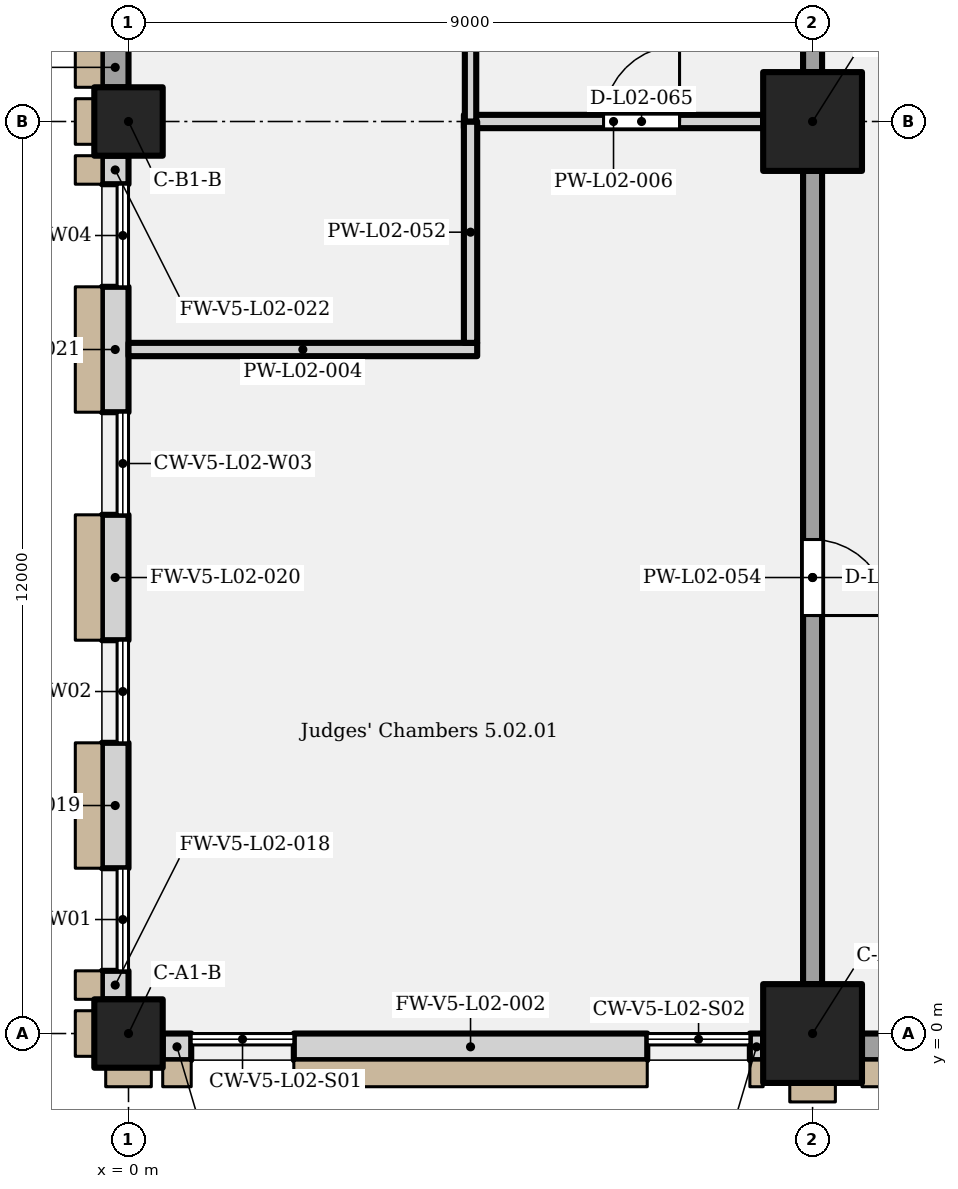
"""IFC4 building model, lengths in metres.
Left out: names, types, materials, properties, quantities, classifications, styles, units other than length and angle.
Written with IfcOpenShell. Run it as: python <this file> out.ifc"""

import sys

from ifc_helpers import new_model, si_unit, direction, frame, frame_2d, origin, origin_with_axes, origin_2d, place, context, subcontext, project, spatial, rectangle, extrude, element, fill, save


model = new_model("IFC4")
c1 = context("Model", 3, precision=1e-05, world=origin(), true_north=direction((0.0, 1.0)))
c2 = subcontext(c1, "Body", "Model", "MODEL_VIEW")
j1 = project(units=[si_unit("LENGTHUNIT", "METRE"), si_unit("PLANEANGLEUNIT", "RADIAN")], contexts=[c1])
p1 = place(None, origin())
s1 = spatial("IfcSite", under=j1, at=p1, CompositionType="ELEMENT")
p2 = place(p1, origin())
s2 = spatial("IfcBuilding", under=s1, at=p2, CompositionType="ELEMENT")
p3 = place(p2, frame((0.0, 0.0, 12.0)))
s3 = spatial("IfcBuildingStorey", under=s2, at=p3, CompositionType="ELEMENT", Elevation=12.0)
p4 = place(p3, origin_with_axes())
e1 = element("IfcColumn", 1, at=p4, inside=s3, PredefinedType="COLUMN", context=c2, shape_type="SweptSolid", body=[
    extrude(rectangle(XDim=0.9, YDim=0.9, at=origin_2d()), origin(), (0.0, 0.0, 1.0), 5.4),
])
p5 = place(p3, frame((9.0, 0.0, 0.0), z_axis=(0.0, 0.0, 1.0), x_axis=(1.0, 0.0, 0.0)))
e2 = element("IfcColumn", 2, at=p5, inside=s3, PredefinedType="COLUMN", context=c2, shape_type="SweptSolid", body=[
    extrude(rectangle(XDim=1.3, YDim=1.3, at=origin_2d()), origin(), (0.0, 0.0, 1.0), 5.4),
])
p6 = place(p3, frame((0.0, 12.0, 0.0), z_axis=(0.0, 0.0, 1.0), x_axis=(1.0, 0.0, 0.0)))
e3 = element("IfcColumn", 3, at=p6, inside=s3, PredefinedType="COLUMN", context=c2, shape_type="SweptSolid", body=[
    extrude(rectangle(XDim=0.9, YDim=0.9, at=origin_2d()), origin(), (0.0, 0.0, 1.0), 5.4),
])
p7 = place(p3, frame((9.0, 12.0, 0.0), z_axis=(0.0, 0.0, 1.0), x_axis=(1.0, 0.0, 0.0)))
e4 = element("IfcColumn", 4, at=p7, inside=s3, PredefinedType="COLUMN", context=c2, shape_type="SweptSolid", body=[
    extrude(rectangle(XDim=1.3, YDim=1.3, at=origin_2d()), origin(), (0.0, 0.0, 1.0), 5.4),
])
p8 = place(p3, frame((0.45, -0.175, 0.0), z_axis=(0.0, 0.0, 1.0), x_axis=(1.0, 0.0, 0.0)))
e5 = element("IfcWall", 5, at=p8, inside=s3, PredefinedType="SOLIDWALL", context=c2, shape_type="SweptSolid", body=[
    extrude(rectangle(XDim=0.375, YDim=0.35, at=frame_2d((0.188, 0.0))), origin(), (0.0, 0.0, 1.0), 5.15),
])
p9 = place(p3, frame((2.175, -0.175, 0.0), z_axis=(0.0, 0.0, 1.0), x_axis=(1.0, 0.0, 0.0)))
e6 = element("IfcWall", 6, at=p9, inside=s3, PredefinedType="SOLIDWALL", context=c2, shape_type="SweptSolid", body=[
    extrude(rectangle(XDim=4.65, YDim=0.35, at=frame_2d((2.325, 0.0))), origin(), (0.0, 0.0, 1.0), 5.15),
])
p10 = place(p3, frame((8.175, -0.175, 0.0), z_axis=(0.0, 0.0, 1.0), x_axis=(1.0, 0.0, 0.0)))
e7 = element("IfcWall", 7, at=p10, inside=s3, PredefinedType="SOLIDWALL", context=c2, shape_type="SweptSolid", body=[
    extrude(rectangle(XDim=0.175, YDim=0.35, at=frame_2d((0.087, 0.0))), origin(), (0.0, 0.0, 1.0), 5.15),
])
p11 = place(p3, frame((9.65, -0.175, 0.0), z_axis=(0.0, 0.0, 1.0), x_axis=(1.0, 0.0, 0.0)))
e8 = element("IfcWall", 8, at=p11, inside=s3, PredefinedType="SOLIDWALL", context=c2, shape_type="SweptSolid", body=[
    extrude(rectangle(XDim=7.7, YDim=0.35, at=frame_2d((3.85, 0.0))), origin(), (0.0, 0.0, 1.0), 5.15),
])
p12 = place(p3, frame((-0.175, 0.45, 0.0), z_axis=(0.0, 0.0, 1.0), x_axis=(0.0, 1.0, 0.0)))
e9 = element("IfcWall", 9, at=p12, inside=s3, PredefinedType="SOLIDWALL", context=c2, shape_type="SweptSolid", body=[
    extrude(rectangle(XDim=0.375, YDim=0.35, at=frame_2d((0.188, 0.0))), origin(), (0.0, 0.0, 1.0), 5.15),
])
for number, where, z_axis, x_axis in (
    (10, (-0.175, 2.175, 0.0), (0.0, 0.0, 1.0), (0.0, 1.0, 0.0)),
    (11, (-0.175, 5.175, 0.0), (0.0, 0.0, 1.0), (0.0, 1.0, 0.0)),
    (12, (-0.175, 8.175, 0.0), (0.0, 0.0, 1.0), (0.0, 1.0, 0.0)),
):
    element("IfcWall", number, at=place(p3, frame(where, z_axis=z_axis, x_axis=x_axis)), inside=s3, PredefinedType="SOLIDWALL", context=c2, shape_type="SweptSolid", body=[
        extrude(rectangle(XDim=1.65, YDim=0.35, at=frame_2d((0.825, 0.0))), origin(), (0.0, 0.0, 1.0), 5.15),
    ])
p13 = place(p3, frame((-0.175, 11.175, 0.0), z_axis=(0.0, 0.0, 1.0), x_axis=(0.0, 1.0, 0.0)))
e13 = element("IfcWall", 13, at=p13, inside=s3, PredefinedType="SOLIDWALL", context=c2, shape_type="SweptSolid", body=[
    extrude(rectangle(XDim=0.375, YDim=0.35, at=frame_2d((0.188, 0.0))), origin(), (0.0, 0.0, 1.0), 5.15),
])
p14 = place(p3, frame((-0.175, 12.45, 0.0), z_axis=(0.0, 0.0, 1.0), x_axis=(0.0, 1.0, 0.0)))
e14 = element("IfcWall", 14, at=p14, inside=s3, PredefinedType="SOLIDWALL", context=c2, shape_type="SweptSolid", body=[
    extrude(rectangle(XDim=0.525, YDim=0.35, at=frame_2d((0.263, 0.0))), origin(), (0.0, 0.0, 1.0), 5.15),
])
p15 = place(p3, frame((0.0, 9.0, 0.0), z_axis=(0.0, 0.0, 1.0), x_axis=(1.0, 0.0, 0.0)))
e15 = element("IfcWall", 15, at=p15, inside=s3, PredefinedType="PARTITIONING", context=c2, shape_type="SweptSolid", body=[
    extrude(rectangle(XDim=4.587, YDim=0.175, at=frame_2d((2.294, 0.0))), origin(), (0.0, 0.0, 1.0), 5.15),
])
p16 = place(p3, frame((4.413, 12.0, 0.0), z_axis=(0.0, 0.0, 1.0), x_axis=(1.0, 0.0, 0.0)))
e16 = element("IfcWall", 16, at=p16, inside=s3, PredefinedType="PARTITIONING", context=c2, shape_type="SweptSolid", body=[
    extrude(rectangle(XDim=3.938, YDim=0.175, at=frame_2d((1.969, 0.0))), origin(), (0.0, 0.0, 1.0), 4.4),
])
p17 = place(p16, frame((1.837, 0.0, 0.0)))
e17 = element("IfcOpeningElement", 17, at=p17, cuts=e16, PredefinedType="OPENING", context=c2, shape_type="SweptSolid", body=[
    extrude(rectangle(XDim=1.0, YDim=2.1, at=frame_2d((0.5, 1.05))), frame((0.0, 0.097, 0.0), z_axis=(0.0, -1.0, 0.0), x_axis=(1.0, 0.0, 0.0)), (0.0, 0.0, 1.0), 0.195),
])
p18 = place(p3, frame((4.5, 9.087, 0.0), z_axis=(0.0, 0.0, 1.0), x_axis=(0.0, 1.0, 0.0)))
e18 = element("IfcWall", 18, at=p18, inside=s3, PredefinedType="PARTITIONING", context=c2, shape_type="SweptSolid", body=[
    extrude(rectangle(XDim=2.913, YDim=0.175, at=frame_2d((1.456, 0.0))), origin(), (0.0, 0.0, 1.0), 5.15),
])
p19 = place(p3, frame((4.5, 12.0, 0.0), z_axis=(0.0, 0.0, 1.0), x_axis=(0.0, 1.0, 0.0)))
e19 = element("IfcWall", 19, at=p19, inside=s3, PredefinedType="PARTITIONING", context=c2, shape_type="SweptSolid", body=[
    extrude(rectangle(XDim=5.025, YDim=0.15, at=frame_2d((2.512, 0.0))), origin(), (0.0, 0.0, 1.0), 5.15),
])
p20 = place(p3, frame((9.0, 0.65, 0.0), z_axis=(0.0, 0.0, 1.0), x_axis=(0.0, 1.0, 0.0)))
e20 = element("IfcWall", 20, at=p20, inside=s3, PredefinedType="PARTITIONING", context=c2, shape_type="SweptSolid", body=[
    extrude(rectangle(XDim=10.7, YDim=0.25, at=frame_2d((5.35, 0.0))), origin(), (0.0, 0.0, 1.0), 4.4),
])
p21 = place(p20, frame((5.85, 0.0, 0.0), z_axis=(0.0, 0.0, 1.0), x_axis=(-1.0, 0.0, 0.0)))
e21 = element("IfcOpeningElement", 21, at=p21, cuts=e20, PredefinedType="OPENING", context=c2, shape_type="SweptSolid", body=[
    extrude(rectangle(XDim=1.0, YDim=2.1, at=frame_2d((0.5, 1.05))), frame((0.0, 0.135, 0.0), z_axis=(0.0, -1.0, 0.0), x_axis=(1.0, 0.0, 0.0)), (0.0, 0.0, 1.0), 0.27),
])
p22 = place(p3, frame((9.0, 12.65, 0.0), z_axis=(0.0, 0.0, 1.0), x_axis=(0.0, 1.0, 0.0)))
e22 = element("IfcWall", 22, at=p22, inside=s3, PredefinedType="PARTITIONING", context=c2, shape_type="SweptSolid", body=[
    extrude(rectangle(XDim=4.375, YDim=0.25, at=frame_2d((2.188, 0.0))), origin(), (0.0, 0.0, 1.0), 4.2),
])
p23 = place(p17, origin())
e23 = element("IfcDoor", 23, at=p23, inside=s3, OperationType="SINGLE_SWING_RIGHT", PredefinedType="DOOR", context=c2, shape_type="SweptSolid", body=[
    extrude(rectangle(XDim=1.0, YDim=2.1, at=frame_2d((0.5, 1.05))), frame((0.0, 0.025, 0.0), z_axis=(0.0, -1.0, 0.0), x_axis=(1.0, 0.0, 0.0)), (0.0, 0.0, 1.0), 0.05),
])
fill(e17, e23)
p24 = place(p21, origin())
e24 = element("IfcDoor", 24, at=p24, inside=s3, OperationType="SINGLE_SWING_RIGHT", PredefinedType="DOOR", context=c2, shape_type="SweptSolid", body=[
    extrude(rectangle(XDim=1.0, YDim=2.1, at=frame_2d((0.5, 1.05))), frame((0.0, 0.025, 0.0), z_axis=(0.0, -1.0, 0.0), x_axis=(1.0, 0.0, 0.0)), (0.0, 0.0, 1.0), 0.05),
])
fill(e21, e24)
save(model, sys.argv[1])
